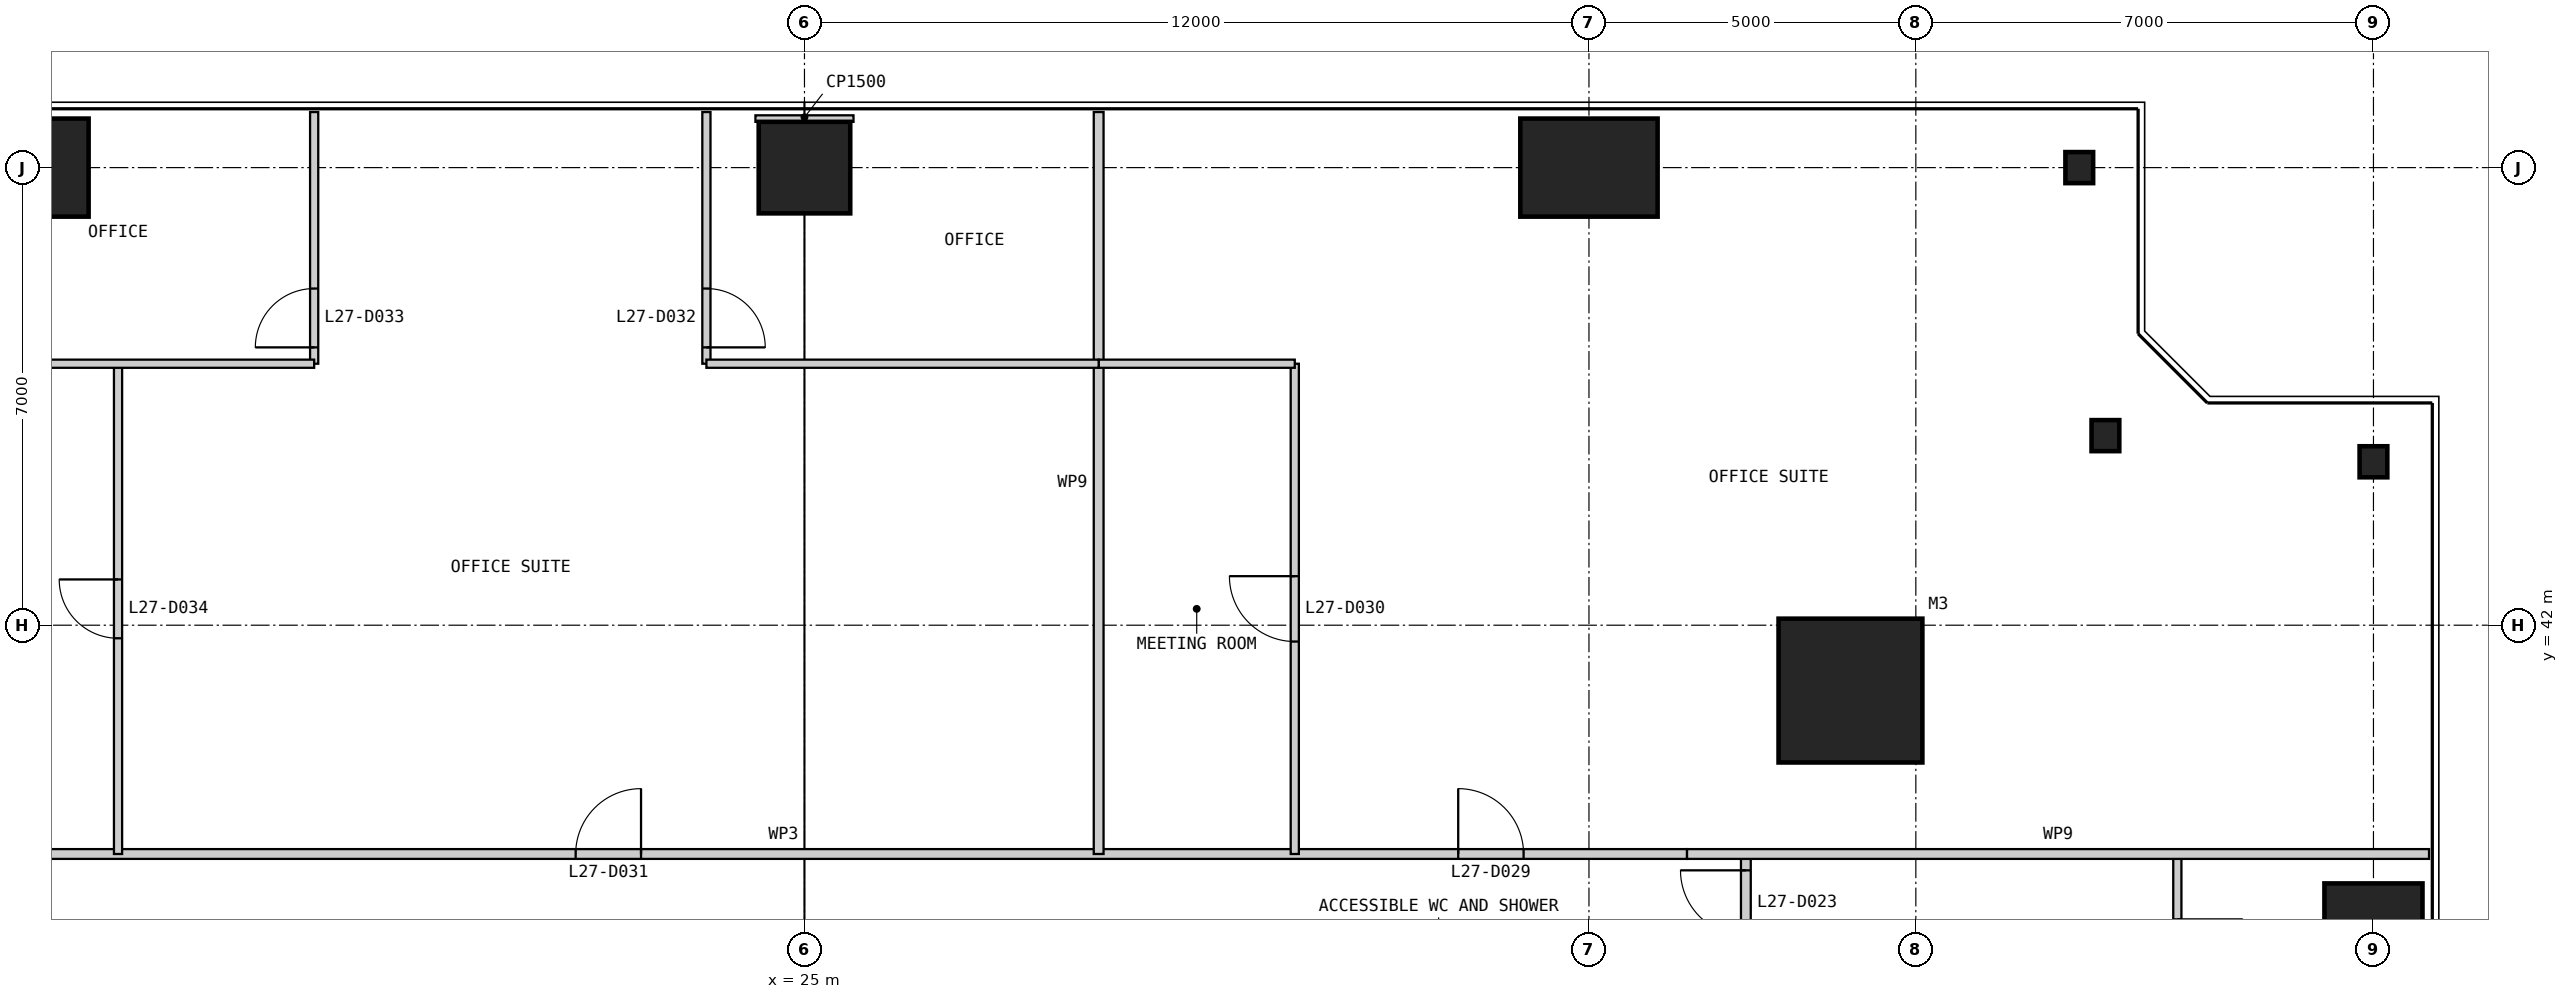
"""IFC4 building model, lengths in metres.
Left out: names, types, materials, properties, quantities, classifications, styles, units other than length and angle.
Written with IfcOpenShell. Run it as: python <this file> out.ifc"""

import sys

from ifc_helpers import new_model, si_unit, direction, frame, frame_2d, origin, origin_2d, place, context, subcontext, project, spatial, rectangle, i_section, extrude, element, fill, save


model = new_model("IFC4")
c1 = context("Model", 3, precision=1e-05, world=origin(), true_north=direction((0.0, 1.0)))
c2 = subcontext(c1, "Body", "Model", "MODEL_VIEW")
j1 = project(units=[si_unit("LENGTHUNIT", "METRE"), si_unit("PLANEANGLEUNIT", "RADIAN")], contexts=[c1])
p1 = place(None, origin())
s1 = spatial("IfcSite", under=j1, at=p1, CompositionType="ELEMENT")
p2 = place(p1, origin())
s2 = spatial("IfcBuilding", under=s1, at=p2, CompositionType="ELEMENT")
p3 = place(p2, frame((0.0, 0.0, 118.4)))
s3 = spatial("IfcBuildingStorey", under=s2, at=p3, CompositionType="ELEMENT", Elevation=118.4)
p4 = place(p3, frame((41.0, 41.0, 0.0), z_axis=(0.0, 0.0, 1.0), x_axis=(1.0, 0.0, 0.0)))
e1 = element("IfcColumn", 1, at=p4, inside=s3, PredefinedType="COLUMN", context=c2, shape_type="SweptSolid", body=[
    extrude(rectangle(XDim=2.2, YDim=2.2, at=origin_2d()), origin(), (0.0, 0.0, 1.0), 4.0),
])
p5 = place(p3, frame((49.0, 37.0, 0.0), z_axis=(0.0, 0.0, 1.0), x_axis=(1.0, 0.0, 0.0)))
e2 = element("IfcColumn", 2, at=p5, inside=s3, PredefinedType="COLUMN", context=c2, shape_type="SweptSolid", body=[
    extrude(rectangle(XDim=1.5, YDim=2.1, at=origin_2d()), origin(), (0.0, 0.0, 1.0), 4.0),
])
for number, where, z_axis, x_axis in (
    (3, (49.0, 44.5, 0.0), (0.0, 0.0, 1.0), (1.0, 0.0, 0.0)),
    (4, (44.9, 44.9, 0.0), (0.0, 0.0, 1.0), (1.0, 0.0, 0.0)),
    (5, (44.5, 49.0, 0.0), (0.0, 0.0, 1.0), (1.0, 0.0, 0.0)),
):
    element("IfcColumn", number, at=place(p3, frame(where, z_axis=z_axis, x_axis=x_axis)), inside=s3, PredefinedType="COLUMN", context=c2, shape_type="SweptSolid", body=[
        extrude(i_section(OverallWidth=0.424, OverallDepth=0.475, WebThickness=0.048, FlangeThickness=0.077, at=origin_2d()), origin(), (0.0, 0.0, 1.0), 4.0),
    ])
p6 = place(p3, frame((37.0, 49.0, 0.0), z_axis=(0.0, 0.0, 1.0), x_axis=(1.0, 0.0, 0.0)))
e6 = element("IfcColumn", 6, at=p6, inside=s3, PredefinedType="COLUMN", context=c2, shape_type="SweptSolid", body=[
    extrude(rectangle(XDim=2.1, YDim=1.5, at=origin_2d()), origin(), (0.0, 0.0, 1.0), 4.0),
])
p7 = place(p3, frame((25.0, 49.0, 0.0), z_axis=(0.0, 0.0, 1.0), x_axis=(1.0, 0.0, 0.0)))
e7 = element("IfcColumn", 7, at=p7, inside=s3, PredefinedType="COLUMN", context=c2, shape_type="SweptSolid", body=[
    extrude(rectangle(XDim=1.4, YDim=1.4, at=origin_2d()), origin(), (0.0, 0.0, 1.0), 4.0),
])
p8 = place(p3, frame((13.0, 49.0, 0.0), z_axis=(0.0, 0.0, 1.0), x_axis=(1.0, 0.0, 0.0)))
e8 = element("IfcColumn", 8, at=p8, inside=s3, PredefinedType="COLUMN", context=c2, shape_type="SweptSolid", body=[
    extrude(rectangle(XDim=2.1, YDim=1.5, at=origin_2d()), origin(), (0.0, 0.0, 1.0), 4.0),
])
p9 = place(p3, frame((39.4, 11.5, 0.0), z_axis=(0.0, 0.0, 1.0), x_axis=(0.0, 1.0, 0.0)))
e9 = element("IfcWall", 9, at=p9, inside=s3, PredefinedType="PARTITIONING", context=c2, shape_type="SweptSolid", body=[
    extrude(rectangle(XDim=27.0, YDim=0.15, at=frame_2d((13.5, 0.0))), origin(), (0.0, 0.0, 1.0), 3.85),
])
p10 = place(p9, frame((3.25, 0.0, 0.0)))
e10 = element("IfcOpeningElement", 10, at=p10, cuts=e9, PredefinedType="OPENING", context=c2, shape_type="SweptSolid", body=[
    extrude(rectangle(XDim=1.0, YDim=2.2, at=frame_2d((0.5, 1.1))), frame((0.0, 0.085, 0.0), z_axis=(0.0, -1.0, 0.0), x_axis=(1.0, 0.0, 0.0)), (0.0, 0.0, 1.0), 0.17),
])
p11 = place(p9, frame((25.75, 0.0, 0.0)))
e11 = element("IfcOpeningElement", 11, at=p11, cuts=e9, PredefinedType="OPENING", context=c2, shape_type="SweptSolid", body=[
    extrude(rectangle(XDim=1.0, YDim=2.2, at=frame_2d((0.5, 1.1))), frame((0.0, 0.085, 0.0), z_axis=(0.0, -1.0, 0.0), x_axis=(1.0, 0.0, 0.0)), (0.0, 0.0, 1.0), 0.17),
])
p12 = place(p9, frame((1.75, 0.0, 0.0)))
e12 = element("IfcOpeningElement", 12, at=p12, cuts=e9, PredefinedType="OPENING", context=c2, shape_type="SweptSolid", body=[
    extrude(rectangle(XDim=1.0, YDim=2.2, at=frame_2d((0.5, 1.1))), frame((0.0, 0.085, 0.0), z_axis=(0.0, -1.0, 0.0), x_axis=(1.0, 0.0, 0.0)), (0.0, 0.0, 1.0), 0.17),
])
p13 = place(p3, frame((46.0, 14.5, 0.0), z_axis=(0.0, 0.0, 1.0), x_axis=(0.0, 1.0, 0.0)))
e13 = element("IfcWall", 13, at=p13, inside=s3, PredefinedType="PARTITIONING", context=c2, shape_type="SweptSolid", body=[
    extrude(rectangle(XDim=24.0, YDim=0.125, at=frame_2d((12.0, 0.0))), origin(), (0.0, 0.0, 1.0), 3.238),
])
p14 = place(p13, frame((4.75, 0.0, 0.0)))
e14 = element("IfcOpeningElement", 14, at=p14, cuts=e13, PredefinedType="OPENING", context=c2, shape_type="SweptSolid", body=[
    extrude(rectangle(XDim=1.0, YDim=2.2, at=frame_2d((0.5, 1.1))), frame((0.0, 0.073, 0.0), z_axis=(0.0, -1.0, 0.0), x_axis=(1.0, 0.0, 0.0)), (0.0, 0.0, 1.0), 0.145),
])
p15 = place(p13, frame((10.0, 0.0, 0.0)))
e15 = element("IfcOpeningElement", 15, at=p15, cuts=e13, PredefinedType="OPENING", context=c2, shape_type="SweptSolid", body=[
    extrude(rectangle(XDim=1.0, YDim=2.2, at=frame_2d((0.5, 1.1))), frame((0.0, 0.073, 0.0), z_axis=(0.0, -1.0, 0.0), x_axis=(1.0, 0.0, 0.0)), (0.0, 0.0, 1.0), 0.145),
])
p16 = place(p13, frame((16.0, 0.0, 0.0)))
e16 = element("IfcOpeningElement", 16, at=p16, cuts=e13, PredefinedType="OPENING", context=c2, shape_type="SweptSolid", body=[
    extrude(rectangle(XDim=1.0, YDim=2.2, at=frame_2d((0.5, 1.1))), frame((0.0, 0.073, 0.0), z_axis=(0.0, -1.0, 0.0), x_axis=(1.0, 0.0, 0.0)), (0.0, 0.0, 1.0), 0.145),
])
p17 = place(p13, frame((22.0, 0.0, 0.0)))
e17 = element("IfcOpeningElement", 17, at=p17, cuts=e13, PredefinedType="OPENING", context=c2, shape_type="SweptSolid", body=[
    extrude(rectangle(XDim=1.0, YDim=2.2, at=frame_2d((0.5, 1.1))), frame((0.0, 0.073, 0.0), z_axis=(0.0, -1.0, 0.0), x_axis=(1.0, 0.0, 0.0)), (0.0, 0.0, 1.0), 0.145),
])
p18 = place(p3, frame((38.5, 38.5, 0.0), z_axis=(0.0, 0.0, 1.0), x_axis=(-1.0, 0.0, 0.0)))
e18 = element("IfcWall", 18, at=p18, inside=s3, PredefinedType="PARTITIONING", context=c2, shape_type="SweptSolid", body=[
    extrude(rectangle(XDim=27.0, YDim=0.15, at=frame_2d((13.5, 0.0))), origin(), (0.0, 0.0, 1.0), 3.85),
])
p19 = place(p18, frame((2.5, 0.0, 0.0)))
e19 = element("IfcOpeningElement", 19, at=p19, cuts=e18, PredefinedType="OPENING", context=c2, shape_type="SweptSolid", body=[
    extrude(rectangle(XDim=1.0, YDim=2.2, at=frame_2d((0.5, 1.1))), frame((0.0, 0.085, 0.0), z_axis=(0.0, -1.0, 0.0), x_axis=(1.0, 0.0, 0.0)), (0.0, 0.0, 1.0), 0.17),
])
p20 = place(p18, frame((16.0, 0.0, 0.0)))
e20 = element("IfcOpeningElement", 20, at=p20, cuts=e18, PredefinedType="OPENING", context=c2, shape_type="SweptSolid", body=[
    extrude(rectangle(XDim=1.0, YDim=2.2, at=frame_2d((0.5, 1.1))), frame((0.0, 0.085, 0.0), z_axis=(0.0, -1.0, 0.0), x_axis=(1.0, 0.0, 0.0)), (0.0, 0.0, 1.0), 0.17),
])
p21 = place(p3, frame((49.85, 38.5, 0.0), z_axis=(0.0, 0.0, 1.0), x_axis=(-1.0, 0.0, 0.0)))
e21 = element("IfcWall", 21, at=p21, inside=s3, PredefinedType="PARTITIONING", context=c2, shape_type="SweptSolid", body=[
    extrude(rectangle(XDim=11.35, YDim=0.15, at=frame_2d((5.675, 0.0))), origin(), (0.0, 0.0, 1.0), 3.85),
])
p22 = place(p3, frame((32.5, 46.0, 0.0), z_axis=(0.0, 0.0, 1.0), x_axis=(0.0, -1.0, 0.0)))
e22 = element("IfcWall", 22, at=p22, inside=s3, PredefinedType="PARTITIONING", context=c2, shape_type="SweptSolid", body=[
    extrude(rectangle(XDim=7.5, YDim=0.125, at=frame_2d((3.75, 0.0))), origin(), (0.0, 0.0, 1.0), 3.85),
])
p23 = place(p22, frame((3.25, 0.0, 0.0)))
e23 = element("IfcOpeningElement", 23, at=p23, cuts=e22, PredefinedType="OPENING", context=c2, shape_type="SweptSolid", body=[
    extrude(rectangle(XDim=1.0, YDim=2.2, at=frame_2d((0.5, 1.1))), frame((0.0, 0.073, 0.0), z_axis=(0.0, -1.0, 0.0), x_axis=(1.0, 0.0, 0.0)), (0.0, 0.0, 1.0), 0.145),
])
p24 = place(p3, frame((29.5, 49.85, 0.0), z_axis=(0.0, 0.0, 1.0), x_axis=(0.0, -1.0, 0.0)))
e24 = element("IfcWall", 24, at=p24, inside=s3, PredefinedType="PARTITIONING", context=c2, shape_type="SweptSolid", body=[
    extrude(rectangle(XDim=11.35, YDim=0.15, at=frame_2d((5.675, 0.0))), origin(), (0.0, 0.0, 1.0), 3.85),
])
p25 = place(p3, frame((23.5, 49.85, 0.0), z_axis=(0.0, 0.0, 1.0), x_axis=(0.0, -1.0, 0.0)))
e25 = element("IfcWall", 25, at=p25, inside=s3, PredefinedType="PARTITIONING", context=c2, shape_type="SweptSolid", body=[
    extrude(rectangle(XDim=3.85, YDim=0.125, at=frame_2d((1.925, 0.0))), origin(), (0.0, 0.0, 1.0), 3.85),
])
p26 = place(p25, frame((2.7, 0.0, 0.0)))
e26 = element("IfcOpeningElement", 26, at=p26, cuts=e25, PredefinedType="OPENING", context=c2, shape_type="SweptSolid", body=[
    extrude(rectangle(XDim=0.9, YDim=2.2, at=frame_2d((0.45, 1.1))), frame((0.0, 0.073, 0.0), z_axis=(0.0, -1.0, 0.0), x_axis=(1.0, 0.0, 0.0)), (0.0, 0.0, 1.0), 0.145),
])
p27 = place(p3, frame((17.5, 49.85, 0.0), z_axis=(0.0, 0.0, 1.0), x_axis=(0.0, -1.0, 0.0)))
e27 = element("IfcWall", 27, at=p27, inside=s3, PredefinedType="PARTITIONING", context=c2, shape_type="SweptSolid", body=[
    extrude(rectangle(XDim=3.85, YDim=0.125, at=frame_2d((1.925, 0.0))), origin(), (0.0, 0.0, 1.0), 3.85),
])
p28 = place(p27, frame((2.7, 0.0, 0.0)))
e28 = element("IfcOpeningElement", 28, at=p28, cuts=e27, PredefinedType="OPENING", context=c2, shape_type="SweptSolid", body=[
    extrude(rectangle(XDim=0.9, YDim=2.2, at=frame_2d((0.45, 1.1))), frame((0.0, 0.073, 0.0), z_axis=(0.0, -1.0, 0.0), x_axis=(1.0, 0.0, 0.0)), (0.0, 0.0, 1.0), 0.145),
])
p29 = place(p3, frame((14.5, 46.0, 0.0), z_axis=(0.0, 0.0, 1.0), x_axis=(0.0, -1.0, 0.0)))
e29 = element("IfcWall", 29, at=p29, inside=s3, PredefinedType="PARTITIONING", context=c2, shape_type="SweptSolid", body=[
    extrude(rectangle(XDim=7.5, YDim=0.125, at=frame_2d((3.75, 0.0))), origin(), (0.0, 0.0, 1.0), 3.85),
])
p30 = place(p29, frame((3.3, 0.0, 0.0)))
e30 = element("IfcOpeningElement", 30, at=p30, cuts=e29, PredefinedType="OPENING", context=c2, shape_type="SweptSolid", body=[
    extrude(rectangle(XDim=0.9, YDim=2.2, at=frame_2d((0.45, 1.1))), frame((0.0, 0.073, 0.0), z_axis=(0.0, -1.0, 0.0), x_axis=(1.0, 0.0, 0.0)), (0.0, 0.0, 1.0), 0.145),
])
p31 = place(p3, frame((32.5, 46.0, 0.0), z_axis=(0.0, 0.0, 1.0), x_axis=(-1.0, 0.0, 0.0)))
e31 = element("IfcWall", 31, at=p31, inside=s3, PredefinedType="PARTITIONING", context=c2, shape_type="SweptSolid", body=[
    extrude(rectangle(XDim=3.0, YDim=0.125, at=frame_2d((1.5, 0.0))), origin(), (0.0, 0.0, 1.0), 3.85),
])
for number, where, z_axis, x_axis in (
    (32, (29.5, 46.0, 0.0), (0.0, 0.0, 1.0), (-1.0, 0.0, 0.0)),
    (33, (17.5, 46.0, 0.0), (0.0, 0.0, 1.0), (-1.0, 0.0, 0.0)),
):
    element("IfcWall", number, at=place(p3, frame(where, z_axis=z_axis, x_axis=x_axis)), inside=s3, PredefinedType="PARTITIONING", context=c2, shape_type="SweptSolid", body=[
        extrude(rectangle(XDim=6.0, YDim=0.125, at=frame_2d((3.0, 0.0))), origin(), (0.0, 0.0, 1.0), 3.85),
    ])
p32 = place(p3, frame((25.0, 49.8, 0.0), z_axis=(0.0, 0.0, 1.0), x_axis=(0.0, -1.0, 0.0)))
e34 = element("IfcWall", 34, at=p32, inside=s3, PredefinedType="PARTITIONING", context=c2, shape_type="SweptSolid", body=[
    extrude(rectangle(XDim=0.1, YDim=1.5, at=frame_2d((0.05, 0.0))), origin(), (0.0, 0.0, 1.0), 3.85),
])
p33 = place(p11, origin())
e35 = element("IfcDoor", 35, at=p33, inside=s3, OperationType="SINGLE_SWING_RIGHT", PredefinedType="DOOR", context=c2, shape_type="SweptSolid", body=[
    extrude(rectangle(XDim=1.0, YDim=2.2, at=frame_2d((0.5, 1.1))), frame((0.0, 0.025, 0.0), z_axis=(0.0, -1.0, 0.0), x_axis=(1.0, 0.0, 0.0)), (0.0, 0.0, 1.0), 0.05),
])
fill(e11, e35)
p34 = place(p19, frame((1.0, 0.0, 0.0), z_axis=(0.0, 0.0, 1.0), x_axis=(-1.0, 0.0, 0.0)))
e36 = element("IfcDoor", 36, at=p34, inside=s3, OperationType="SINGLE_SWING_LEFT", PredefinedType="DOOR", context=c2, shape_type="SweptSolid", body=[
    extrude(rectangle(XDim=1.0, YDim=2.2, at=frame_2d((0.5, 1.1))), frame((0.0, 0.025, 0.0), z_axis=(0.0, -1.0, 0.0), x_axis=(1.0, 0.0, 0.0)), (0.0, 0.0, 1.0), 0.05),
])
fill(e19, e36)
p35 = place(p23, frame((1.0, 0.0, 0.0), z_axis=(0.0, 0.0, 1.0), x_axis=(-1.0, 0.0, 0.0)))
e37 = element("IfcDoor", 37, at=p35, inside=s3, OperationType="SINGLE_SWING_RIGHT", PredefinedType="DOOR", context=c2, shape_type="SweptSolid", body=[
    extrude(rectangle(XDim=1.0, YDim=2.2, at=frame_2d((0.5, 1.1))), frame((0.0, 0.025, 0.0), z_axis=(0.0, -1.0, 0.0), x_axis=(1.0, 0.0, 0.0)), (0.0, 0.0, 1.0), 0.05),
])
fill(e23, e37)
p36 = place(p20, frame((1.0, 0.0, 0.0), z_axis=(0.0, 0.0, 1.0), x_axis=(-1.0, 0.0, 0.0)))
e38 = element("IfcDoor", 38, at=p36, inside=s3, OperationType="SINGLE_SWING_RIGHT", PredefinedType="DOOR", context=c2, shape_type="SweptSolid", body=[
    extrude(rectangle(XDim=1.0, YDim=2.2, at=frame_2d((0.5, 1.1))), frame((0.0, 0.025, 0.0), z_axis=(0.0, -1.0, 0.0), x_axis=(1.0, 0.0, 0.0)), (0.0, 0.0, 1.0), 0.05),
])
fill(e20, e38)
p37 = place(p26, origin())
e39 = element("IfcDoor", 39, at=p37, inside=s3, OperationType="SINGLE_SWING_RIGHT", PredefinedType="DOOR", context=c2, shape_type="SweptSolid", body=[
    extrude(rectangle(XDim=0.9, YDim=2.2, at=frame_2d((0.45, 1.1))), frame((0.0, 0.025, 0.0), z_axis=(0.0, -1.0, 0.0), x_axis=(1.0, 0.0, 0.0)), (0.0, 0.0, 1.0), 0.05),
])
fill(e26, e39)
p38 = place(p28, frame((0.9, 0.0, 0.0), z_axis=(0.0, 0.0, 1.0), x_axis=(-1.0, 0.0, 0.0)))
e40 = element("IfcDoor", 40, at=p38, inside=s3, OperationType="SINGLE_SWING_LEFT", PredefinedType="DOOR", context=c2, shape_type="SweptSolid", body=[
    extrude(rectangle(XDim=0.9, YDim=2.2, at=frame_2d((0.45, 1.1))), frame((0.0, 0.025, 0.0), z_axis=(0.0, -1.0, 0.0), x_axis=(1.0, 0.0, 0.0)), (0.0, 0.0, 1.0), 0.05),
])
fill(e28, e40)
p39 = place(p30, frame((0.9, 0.0, 0.0), z_axis=(0.0, 0.0, 1.0), x_axis=(-1.0, 0.0, 0.0)))
e41 = element("IfcDoor", 41, at=p39, inside=s3, OperationType="SINGLE_SWING_RIGHT", PredefinedType="DOOR", context=c2, shape_type="SweptSolid", body=[
    extrude(rectangle(XDim=0.9, YDim=2.2, at=frame_2d((0.45, 1.1))), frame((0.0, 0.025, 0.0), z_axis=(0.0, -1.0, 0.0), x_axis=(1.0, 0.0, 0.0)), (0.0, 0.0, 1.0), 0.05),
])
fill(e30, e41)
save(model, sys.argv[1])
